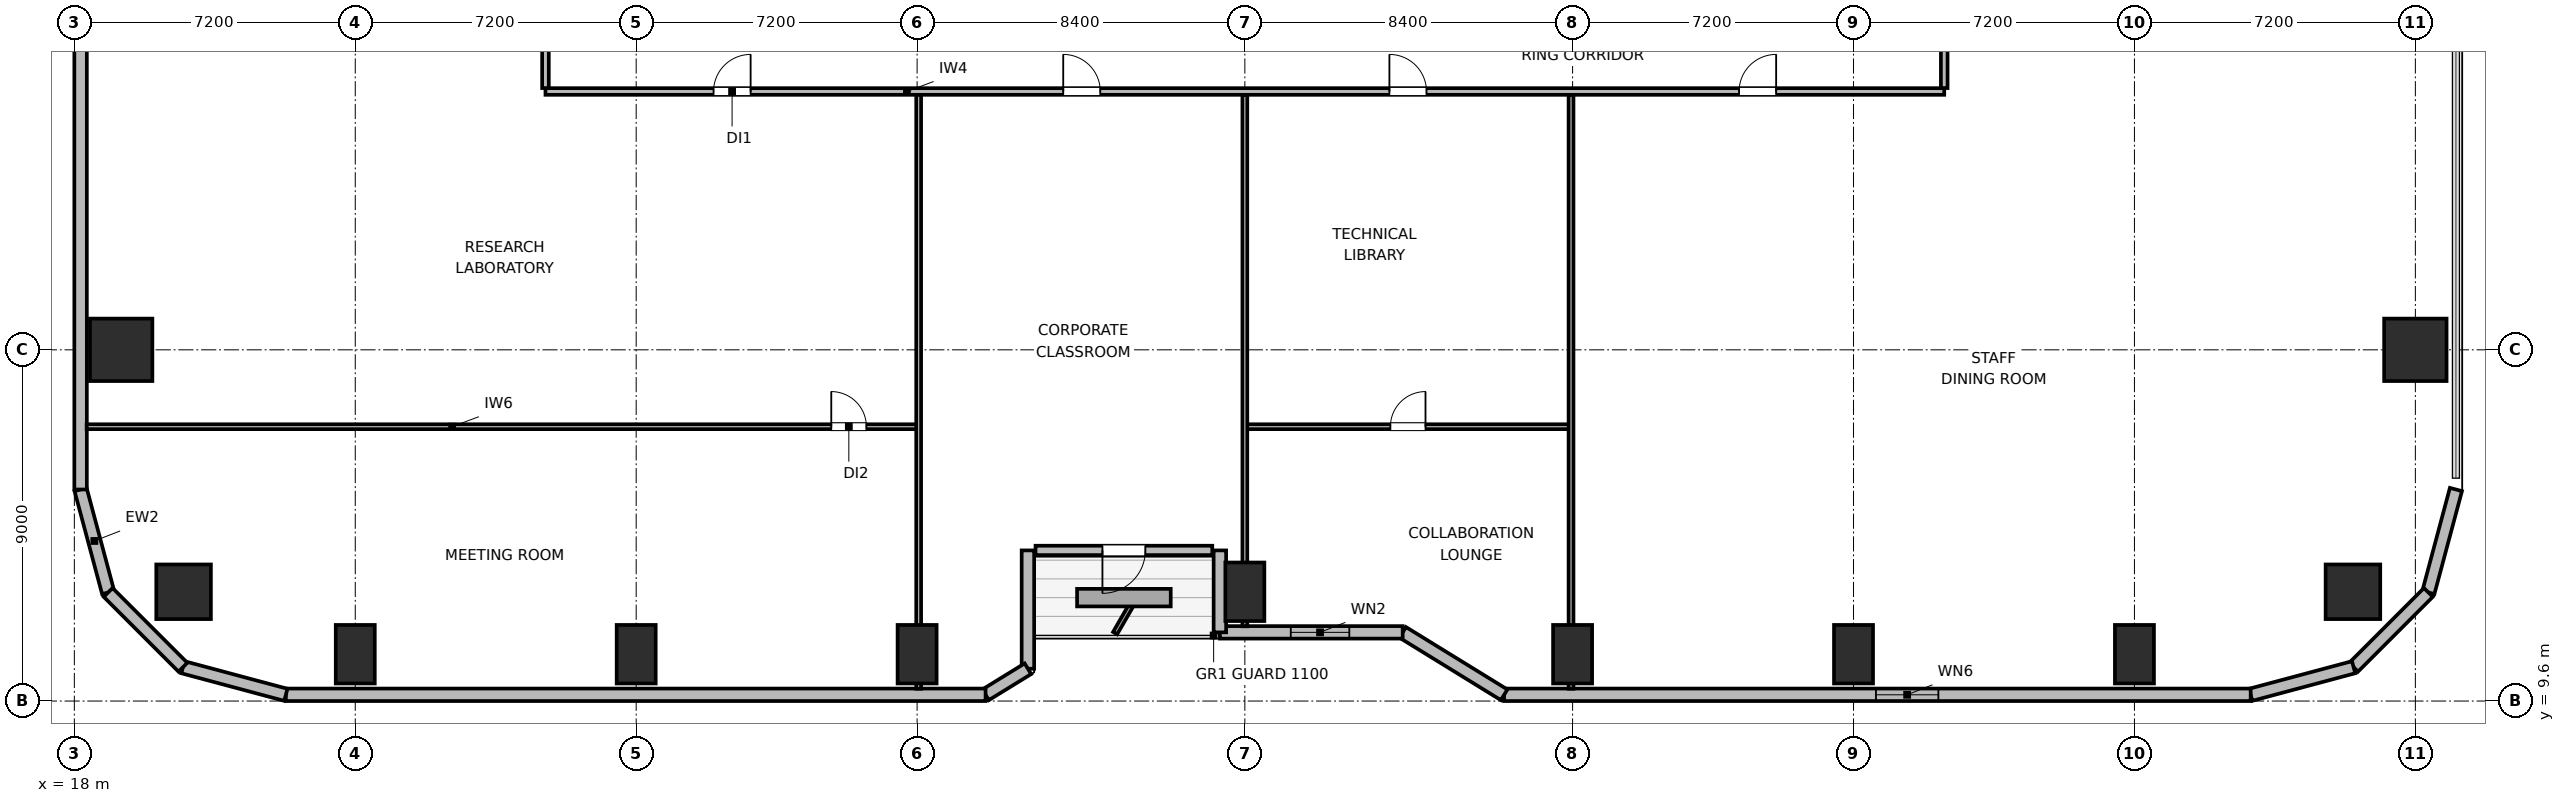
"""IFC4 building model, lengths in metres.
Left out: names, types, materials, properties, quantities, classifications, styles, units other than length and angle.
Written with IfcOpenShell. Run it as: python <this file> out.ifc"""

import sys

from ifc_helpers import new_model, si_unit, direction, frame, frame_2d, origin, origin_2d, place, context, subcontext, project, spatial, rectangle, circle, extrude, element, fill, save


model = new_model("IFC4")
c1 = context("Model", 3, precision=1e-05, world=origin(), true_north=direction((0.0, 1.0)))
c2 = subcontext(c1, "Body", "Model", "MODEL_VIEW")
j1 = project(units=[si_unit("LENGTHUNIT", "METRE"), si_unit("PLANEANGLEUNIT", "RADIAN")], contexts=[c1])
p1 = place(None, origin())
s1 = spatial("IfcSite", under=j1, at=p1, CompositionType="ELEMENT")
p2 = place(p1, origin())
s2 = spatial("IfcBuilding", under=s1, at=p2, CompositionType="ELEMENT")
p3 = place(p2, frame((0.0, 0.0, 33.3)))
s3 = spatial("IfcBuildingStorey", under=s2, at=p3, CompositionType="ELEMENT", Elevation=33.3)
for number, where, z_axis, x_axis in (
    (1, (20.8, 12.4, 0.0), (0.0, 0.0, 1.0), (1.0, 0.0, 0.0)),
    (2, (76.4, 12.4, 0.0), (0.0, 0.0, 1.0), (1.0, 0.0, 0.0)),
):
    element("IfcColumn", number, at=place(p3, frame(where, z_axis=z_axis, x_axis=x_axis)), inside=s3, PredefinedType="COLUMN", context=c2, shape_type="SweptSolid", body=[
        extrude(circle(Radius=0.7, at=origin_2d()), origin(), (0.0, 0.0, 1.0), 3.9),
    ])
for number, where, z_axis, x_axis in (
    (3, (25.2, 10.8, 0.0), (0.0, 0.0, 1.0), (1.0, 0.0, 0.0)),
    (4, (32.4, 10.8, 0.0), (0.0, 0.0, 1.0), (1.0, 0.0, 0.0)),
    (5, (39.6, 10.8, 0.0), (0.0, 0.0, 1.0), (1.0, 0.0, 0.0)),
    (6, (48.0, 12.4, 0.0), (0.0, 0.0, 1.0), (1.0, 0.0, 0.0)),
    (7, (56.4, 10.8, 0.0), (0.0, 0.0, 1.0), (1.0, 0.0, 0.0)),
    (8, (63.6, 10.8, 0.0), (0.0, 0.0, 1.0), (1.0, 0.0, 0.0)),
    (9, (70.8, 10.8, 0.0), (0.0, 0.0, 1.0), (1.0, 0.0, 0.0)),
):
    element("IfcColumn", number, at=place(p3, frame(where, z_axis=z_axis, x_axis=x_axis)), inside=s3, PredefinedType="COLUMN", context=c2, shape_type="SweptSolid", body=[
        extrude(rectangle(XDim=1.0, YDim=1.5, at=origin_2d()), origin(), (0.0, 0.0, 1.0), 3.9),
    ])
for number, where, z_axis, x_axis in (
    (10, (19.2, 18.6, 0.0), (0.0, 0.0, 1.0), (1.0, 0.0, 0.0)),
    (11, (78.0, 18.6, 0.0), (0.0, 0.0, 1.0), (1.0, 0.0, 0.0)),
):
    element("IfcColumn", number, at=place(p3, frame(where, z_axis=z_axis, x_axis=x_axis)), inside=s3, PredefinedType="COLUMN", context=c2, shape_type="SweptSolid", body=[
        extrude(rectangle(XDim=1.6, YDim=1.6, at=origin_2d()), origin(), (0.0, 0.0, 1.0), 3.9),
    ])
p4 = place(p3, frame((18.866, 12.383, 0.0), z_axis=(0.0, 0.0, 1.0), x_axis=(-0.25869736047, 0.965958423373, 0.0)))
e12 = element("IfcWall", 12, at=p4, inside=s3, PredefinedType="SOLIDWALL", context=c2, shape_type="SweptSolid", body=[
    extrude(rectangle(XDim=2.731, YDim=0.32, at=frame_2d((1.366, 0.0))), origin(), (0.0, 0.0, 1.0), 3.64),
])
p5 = place(p3, frame((18.16, 15.021, 0.0), z_axis=(0.0, 0.0, 1.0), x_axis=(0.0, 1.0, 0.0)))
e13 = element("IfcWall", 13, at=p5, inside=s3, PredefinedType="SOLIDWALL", context=c2, shape_type="SweptSolid", body=[
    extrude(rectangle(XDim=14.219, YDim=0.32, at=frame_2d((7.109, 0.0))), origin(), (0.0, 0.0, 1.0), 3.64),
])
p6 = place(p3, frame((79.04, 15.021, 0.0), z_axis=(0.0, 0.0, 1.0), x_axis=(-0.25869736047, -0.965958423373, 0.0)))
e14 = element("IfcWall", 14, at=p6, inside=s3, PredefinedType="SOLIDWALL", context=c2, shape_type="SweptSolid", body=[
    extrude(rectangle(XDim=2.731, YDim=0.32, at=frame_2d((1.366, 0.0))), origin(), (0.0, 0.0, 1.0), 3.64),
])
p7 = place(p3, frame((78.333, 12.383, 0.0), z_axis=(0.0, 0.0, 1.0), x_axis=(-0.707106781187, -0.707106781187, 0.0)))
e15 = element("IfcWall", 15, at=p7, inside=s3, PredefinedType="SOLIDWALL", context=c2, shape_type="SweptSolid", body=[
    extrude(rectangle(XDim=2.71, YDim=0.32, at=frame_2d((1.355, 0.0))), origin(), (0.0, 0.0, 1.0), 3.64),
])
p8 = place(p3, frame((76.417, 10.467, 0.0), z_axis=(0.0, 0.0, 1.0), x_axis=(-0.965964405026, -0.25867502435, 0.0)))
e16 = element("IfcWall", 16, at=p8, inside=s3, PredefinedType="SOLIDWALL", context=c2, shape_type="SweptSolid", body=[
    extrude(rectangle(XDim=2.731, YDim=0.32, at=frame_2d((1.366, 0.0))), origin(), (0.0, 0.0, 1.0), 3.64),
])
p9 = place(p3, frame((73.779, 9.76, 0.0), z_axis=(0.0, 0.0, 1.0), x_axis=(-1.0, 0.0, 0.0)))
e17 = element("IfcWall", 17, at=p9, inside=s3, PredefinedType="SOLIDWALL", context=c2, shape_type="SweptSolid", body=[
    extrude(rectangle(XDim=19.134, YDim=0.32, at=frame_2d((9.567, 0.0))), origin(), (0.0, 0.0, 1.0), 3.64),
])
p10 = place(p9, frame((8.004, 0.0, 0.85)))
e18 = element("IfcOpeningElement", 18, at=p10, cuts=e17, PredefinedType="OPENING", context=c2, shape_type="SweptSolid", body=[
    extrude(rectangle(XDim=1.6, YDim=1.0, at=frame_2d((0.8, 0.5))), frame((0.0, 0.17, 0.0), z_axis=(0.0, -1.0, 0.0), x_axis=(1.0, 0.0, 0.0)), (0.0, 0.0, 1.0), 0.34),
])
p11 = place(p3, frame((54.645, 9.76, 0.0), z_axis=(0.0, 0.0, 1.0), x_axis=(-0.851630857047, 0.524142044989, 0.0)))
e19 = element("IfcWall", 19, at=p11, inside=s3, PredefinedType="SOLIDWALL", context=c2, shape_type="SweptSolid", body=[
    extrude(rectangle(XDim=3.053, YDim=0.32, at=frame_2d((1.526, 0.0))), origin(), (0.0, 0.0, 1.0), 2.875),
])
p12 = place(p3, frame((52.045, 11.36, 0.0), z_axis=(0.0, 0.0, 1.0), x_axis=(-1.0, 0.0, 0.0)))
e20 = element("IfcWall", 20, at=p12, inside=s3, PredefinedType="SOLIDWALL", context=c2, shape_type="SweptSolid", body=[
    extrude(rectangle(XDim=4.685, YDim=0.32, at=frame_2d((2.343, 0.0))), origin(), (0.0, 0.0, 1.0), 2.875),
])
p13 = place(p12, frame((1.368, 0.0, 0.85)))
e21 = element("IfcOpeningElement", 21, at=p13, cuts=e20, PredefinedType="OPENING", context=c2, shape_type="SweptSolid", body=[
    extrude(rectangle(XDim=1.5, YDim=1.1, at=frame_2d((0.75, 0.55))), frame((0.0, 0.17, 0.0), z_axis=(0.0, -1.0, 0.0), x_axis=(1.0, 0.0, 0.0)), (0.0, 0.0, 1.0), 0.34),
])
p14 = place(p3, frame((47.36, 11.36, 0.0), z_axis=(0.0, 0.0, 1.0), x_axis=(0.0, 1.0, 0.0)))
e22 = element("IfcWall", 22, at=p14, inside=s3, PredefinedType="SOLIDWALL", context=c2, shape_type="SweptSolid", body=[
    extrude(rectangle(XDim=2.1, YDim=0.32, at=frame_2d((1.05, 0.0))), origin(), (0.0, 0.0, 1.0), 2.875),
])
p15 = place(p3, frame((47.165, 13.46, 0.0), z_axis=(0.0, 0.0, 1.0), x_axis=(-1.0, 0.0, 0.0)))
e23 = element("IfcWall", 23, at=p15, inside=s3, PredefinedType="SOLIDWALL", context=c2, shape_type="SweptSolid", body=[
    extrude(rectangle(XDim=4.53, YDim=0.24, at=frame_2d((2.265, 0.0))), origin(), (0.0, 0.0, 1.0), 3.64),
])
p16 = place(p15, frame((1.715, 0.0, 0.0)))
e24 = element("IfcOpeningElement", 24, at=p16, cuts=e23, PredefinedType="OPENING", context=c2, shape_type="SweptSolid", body=[
    extrude(rectangle(XDim=1.1, YDim=2.04, at=frame_2d((0.55, 1.02))), frame((0.0, 0.13, 0.0), z_axis=(0.0, -1.0, 0.0), x_axis=(1.0, 0.0, 0.0)), (0.0, 0.0, 1.0), 0.26),
])
p17 = place(p3, frame((42.44, 13.46, 0.0), z_axis=(0.0, 0.0, 1.0), x_axis=(0.0, -1.0, 0.0)))
e25 = element("IfcWall", 25, at=p17, inside=s3, PredefinedType="SOLIDWALL", context=c2, shape_type="SweptSolid", body=[
    extrude(rectangle(XDim=3.032, YDim=0.32, at=frame_2d((1.516, 0.0))), origin(), (0.0, 0.0, 1.0), 2.875),
])
p18 = place(p3, frame((42.44, 10.427, 0.0), z_axis=(0.0, 0.0, 1.0), x_axis=(-0.851776724646, -0.523904964045, 0.0)))
e26 = element("IfcWall", 26, at=p18, inside=s3, PredefinedType="SOLIDWALL", context=c2, shape_type="SweptSolid", body=[
    extrude(rectangle(XDim=1.274, YDim=0.32, at=frame_2d((0.637, 0.0))), origin(), (0.0, 0.0, 1.0), 3.64),
])
p19 = place(p3, frame((41.355, 9.76, 0.0), z_axis=(0.0, 0.0, 1.0), x_axis=(-1.0, 0.0, 0.0)))
e27 = element("IfcWall", 27, at=p19, inside=s3, PredefinedType="SOLIDWALL", context=c2, shape_type="SweptSolid", body=[
    extrude(rectangle(XDim=17.934, YDim=0.32, at=frame_2d((8.967, 0.0))), origin(), (0.0, 0.0, 1.0), 3.64),
])
p20 = place(p3, frame((23.421, 9.76, 0.0), z_axis=(0.0, 0.0, 1.0), x_axis=(-0.965964405026, 0.25867502435, 0.0)))
e28 = element("IfcWall", 28, at=p20, inside=s3, PredefinedType="SOLIDWALL", context=c2, shape_type="SweptSolid", body=[
    extrude(rectangle(XDim=2.731, YDim=0.32, at=frame_2d((1.366, 0.0))), origin(), (0.0, 0.0, 1.0), 3.64),
])
p21 = place(p3, frame((20.783, 10.467, 0.0), z_axis=(0.0, 0.0, 1.0), x_axis=(-0.707106781187, 0.707106781187, 0.0)))
e29 = element("IfcWall", 29, at=p21, inside=s3, PredefinedType="SOLIDWALL", context=c2, shape_type="SweptSolid", body=[
    extrude(rectangle(XDim=2.71, YDim=0.32, at=frame_2d((1.355, 0.0))), origin(), (0.0, 0.0, 1.0), 3.64),
])
p22 = place(p3, frame((30.075, 25.22, 0.0), z_axis=(0.0, 0.0, 1.0), x_axis=(1.0, 0.0, 0.0)))
e30 = element("IfcWall", 30, at=p22, inside=s3, PredefinedType="PARTITIONING", context=c2, shape_type="SweptSolid", body=[
    extrude(rectangle(XDim=35.85, YDim=0.17, at=frame_2d((17.925, 0.0))), origin(), (0.0, 0.0, 1.0), 3.64),
])
p23 = place(p22, frame((4.308, 0.0, 0.0)))
e31 = element("IfcOpeningElement", 31, at=p23, cuts=e30, PredefinedType="OPENING", context=c2, shape_type="SweptSolid", body=[
    extrude(rectangle(XDim=0.95, YDim=2.04, at=frame_2d((0.475, 1.02))), frame((0.0, 0.095, 0.0), z_axis=(0.0, -1.0, 0.0), x_axis=(1.0, 0.0, 0.0)), (0.0, 0.0, 1.0), 0.19),
])
p24 = place(p22, frame((13.27, 0.0, 0.0)))
e32 = element("IfcOpeningElement", 32, at=p24, cuts=e30, PredefinedType="OPENING", context=c2, shape_type="SweptSolid", body=[
    extrude(rectangle(XDim=0.95, YDim=2.04, at=frame_2d((0.475, 1.02))), frame((0.0, 0.095, 0.0), z_axis=(0.0, -1.0, 0.0), x_axis=(1.0, 0.0, 0.0)), (0.0, 0.0, 1.0), 0.19),
])
p25 = place(p22, frame((21.63, 0.0, 0.0)))
e33 = element("IfcOpeningElement", 33, at=p25, cuts=e30, PredefinedType="OPENING", context=c2, shape_type="SweptSolid", body=[
    extrude(rectangle(XDim=0.95, YDim=2.04, at=frame_2d((0.475, 1.02))), frame((0.0, 0.095, 0.0), z_axis=(0.0, -1.0, 0.0), x_axis=(1.0, 0.0, 0.0)), (0.0, 0.0, 1.0), 0.19),
])
p26 = place(p22, frame((30.592, 0.0, 0.0)))
e34 = element("IfcOpeningElement", 34, at=p26, cuts=e30, PredefinedType="OPENING", context=c2, shape_type="SweptSolid", body=[
    extrude(rectangle(XDim=0.95, YDim=2.04, at=frame_2d((0.475, 1.02))), frame((0.0, 0.095, 0.0), z_axis=(0.0, -1.0, 0.0), x_axis=(1.0, 0.0, 0.0)), (0.0, 0.0, 1.0), 0.19),
])
p27 = place(p3, frame((30.075, 25.307, 0.0), z_axis=(0.0, 0.0, 1.0), x_axis=(0.0, 1.0, 0.0)))
e35 = element("IfcWall", 35, at=p27, inside=s3, PredefinedType="PARTITIONING", context=c2, shape_type="SweptSolid", body=[
    extrude(rectangle(XDim=21.386, YDim=0.17, at=frame_2d((10.693, 0.0))), origin(), (0.0, 0.0, 1.0), 3.64),
])
p28 = place(p27, frame((3.528, 0.0, 0.0)))
e36 = element("IfcOpeningElement", 36, at=p28, cuts=e35, PredefinedType="OPENING", context=c2, shape_type="SweptSolid", body=[
    extrude(rectangle(XDim=0.95, YDim=2.04, at=frame_2d((0.475, 1.02))), frame((0.0, 0.095, 0.0), z_axis=(0.0, -1.0, 0.0), x_axis=(1.0, 0.0, 0.0)), (0.0, 0.0, 1.0), 0.19),
])
p29 = place(p27, frame((10.818, 0.0, 0.0)))
e37 = element("IfcOpeningElement", 37, at=p29, cuts=e35, PredefinedType="OPENING", context=c2, shape_type="SweptSolid", body=[
    extrude(rectangle(XDim=0.95, YDim=2.04, at=frame_2d((0.475, 1.02))), frame((0.0, 0.095, 0.0), z_axis=(0.0, -1.0, 0.0), x_axis=(1.0, 0.0, 0.0)), (0.0, 0.0, 1.0), 0.19),
])
p30 = place(p27, frame((17.508, 0.0, 0.0)))
e38 = element("IfcOpeningElement", 38, at=p30, cuts=e35, PredefinedType="OPENING", context=c2, shape_type="SweptSolid", body=[
    extrude(rectangle(XDim=0.95, YDim=2.04, at=frame_2d((0.475, 1.02))), frame((0.0, 0.095, 0.0), z_axis=(0.0, -1.0, 0.0), x_axis=(1.0, 0.0, 0.0)), (0.0, 0.0, 1.0), 0.19),
])
p31 = place(p3, frame((65.925, 25.307, 0.0), z_axis=(0.0, 0.0, 1.0), x_axis=(0.0, 1.0, 0.0)))
e39 = element("IfcWall", 39, at=p31, inside=s3, PredefinedType="PARTITIONING", context=c2, shape_type="SweptSolid", body=[
    extrude(rectangle(XDim=21.386, YDim=0.17, at=frame_2d((10.693, 0.0))), origin(), (0.0, 0.0, 1.0), 3.64),
])
p32 = place(p31, frame((5.428, 0.0, 0.0)))
e40 = element("IfcOpeningElement", 40, at=p32, cuts=e39, PredefinedType="OPENING", context=c2, shape_type="SweptSolid", body=[
    extrude(rectangle(XDim=0.95, YDim=2.04, at=frame_2d((0.475, 1.02))), frame((0.0, 0.095, 0.0), z_axis=(0.0, -1.0, 0.0), x_axis=(1.0, 0.0, 0.0)), (0.0, 0.0, 1.0), 0.19),
])
p33 = place(p31, frame((16.208, 0.0, 0.0)))
e41 = element("IfcOpeningElement", 41, at=p33, cuts=e39, PredefinedType="OPENING", context=c2, shape_type="SweptSolid", body=[
    extrude(rectangle(XDim=0.95, YDim=2.04, at=frame_2d((0.475, 1.02))), frame((0.0, 0.095, 0.0), z_axis=(0.0, -1.0, 0.0), x_axis=(1.0, 0.0, 0.0)), (0.0, 0.0, 1.0), 0.19),
])
p34 = place(p3, frame((18.315, 16.63, 0.0), z_axis=(0.0, 0.0, 1.0), x_axis=(1.0, 0.0, 0.0)))
e42 = element("IfcWall", 42, at=p34, inside=s3, PredefinedType="PARTITIONING", context=c2, shape_type="SweptSolid", body=[
    extrude(rectangle(XDim=21.325, YDim=0.125, at=frame_2d((10.663, 0.0))), origin(), (0.0, 0.0, 1.0), 3.64),
])
p35 = place(p34, frame((19.085, 0.0, 0.0)))
e43 = element("IfcOpeningElement", 43, at=p35, cuts=e42, PredefinedType="OPENING", context=c2, shape_type="SweptSolid", body=[
    extrude(rectangle(XDim=0.9, YDim=2.02, at=frame_2d((0.45, 1.01))), frame((0.0, 0.073, 0.0), z_axis=(0.0, -1.0, 0.0), x_axis=(1.0, 0.0, 0.0)), (0.0, 0.0, 1.0), 0.145),
])
p36 = place(p3, frame((39.64, 9.915, 0.0), z_axis=(0.0, 0.0, 1.0), x_axis=(0.0, 1.0, 0.0)))
e44 = element("IfcWall", 44, at=p36, inside=s3, PredefinedType="PARTITIONING", context=c2, shape_type="SweptSolid", body=[
    extrude(rectangle(XDim=15.218, YDim=0.125, at=frame_2d((7.609, 0.0))), origin(), (0.0, 0.0, 1.0), 2.93),
])
p37 = place(p3, frame((48.0, 16.63, 0.0), z_axis=(0.0, 0.0, 1.0), x_axis=(1.0, 0.0, 0.0)))
e45 = element("IfcWall", 45, at=p37, inside=s3, PredefinedType="PARTITIONING", context=c2, shape_type="SweptSolid", body=[
    extrude(rectangle(XDim=8.36, YDim=0.125, at=frame_2d((4.18, 0.0))), origin(), (0.0, 0.0, 1.0), 3.64),
])
p38 = place(p37, frame((3.73, 0.0, 0.0)))
e46 = element("IfcOpeningElement", 46, at=p38, cuts=e45, PredefinedType="OPENING", context=c2, shape_type="SweptSolid", body=[
    extrude(rectangle(XDim=0.9, YDim=2.02, at=frame_2d((0.45, 1.01))), frame((0.0, 0.073, 0.0), z_axis=(0.0, -1.0, 0.0), x_axis=(1.0, 0.0, 0.0)), (0.0, 0.0, 1.0), 0.145),
])
p39 = place(p3, frame((48.0, 11.515, 0.0), z_axis=(0.0, 0.0, 1.0), x_axis=(0.0, 1.0, 0.0)))
e47 = element("IfcWall", 47, at=p39, inside=s3, PredefinedType="PARTITIONING", context=c2, shape_type="SweptSolid", body=[
    extrude(rectangle(XDim=13.618, YDim=0.125, at=frame_2d((6.809, 0.0))), origin(), (0.0, 0.0, 1.0), 2.93),
])
p40 = place(p3, frame((56.36, 9.915, 0.0), z_axis=(0.0, 0.0, 1.0), x_axis=(0.0, 1.0, 0.0)))
e48 = element("IfcWall", 48, at=p40, inside=s3, PredefinedType="PARTITIONING", context=c2, shape_type="SweptSolid", body=[
    extrude(rectangle(XDim=15.218, YDim=0.125, at=frame_2d((7.609, 0.0))), origin(), (0.0, 0.0, 1.0), 2.93),
])
p41 = place(p10, origin())
e49 = element("IfcWindow", 49, at=p41, inside=s3, PartitioningType="SINGLE_PANEL", PredefinedType="WINDOW", context=c2, shape_type="SweptSolid", body=[
    extrude(rectangle(XDim=1.6, YDim=1.0, at=frame_2d((0.8, 0.5))), frame((0.0, 0.03, 0.0), z_axis=(0.0, -1.0, 0.0), x_axis=(1.0, 0.0, 0.0)), (0.0, 0.0, 1.0), 0.06),
])
fill(e18, e49)
p42 = place(p13, origin())
e50 = element("IfcWindow", 50, at=p42, inside=s3, PartitioningType="SINGLE_PANEL", PredefinedType="WINDOW", context=c2, shape_type="SweptSolid", body=[
    extrude(rectangle(XDim=1.5, YDim=1.1, at=frame_2d((0.75, 0.55))), frame((0.0, 0.03, 0.0), z_axis=(0.0, -1.0, 0.0), x_axis=(1.0, 0.0, 0.0)), (0.0, 0.0, 1.0), 0.06),
])
fill(e21, e50)
p43 = place(p16, origin())
e51 = element("IfcDoor", 51, at=p43, inside=s3, OperationType="SINGLE_SWING_RIGHT", PredefinedType="DOOR", context=c2, shape_type="SweptSolid", body=[
    extrude(rectangle(XDim=1.1, YDim=2.04, at=frame_2d((0.55, 1.02))), frame((0.0, 0.025, 0.0), z_axis=(0.0, -1.0, 0.0), x_axis=(1.0, 0.0, 0.0)), (0.0, 0.0, 1.0), 0.05),
])
fill(e24, e51)
p44 = place(p35, origin())
e52 = element("IfcDoor", 52, at=p44, inside=s3, OperationType="SINGLE_SWING_LEFT", PredefinedType="DOOR", context=c2, shape_type="SweptSolid", body=[
    extrude(rectangle(XDim=0.9, YDim=2.02, at=frame_2d((0.45, 1.01))), frame((0.0, 0.025, 0.0), z_axis=(0.0, -1.0, 0.0), x_axis=(1.0, 0.0, 0.0)), (0.0, 0.0, 1.0), 0.05),
])
fill(e43, e52)
p45 = place(p23, origin())
e53 = element("IfcDoor", 53, at=p45, inside=s3, OperationType="SINGLE_SWING_RIGHT", PredefinedType="DOOR", context=c2, shape_type="SweptSolid", body=[
    extrude(rectangle(XDim=0.95, YDim=2.04, at=frame_2d((0.475, 1.02))), frame((0.0, 0.025, 0.0), z_axis=(0.0, -1.0, 0.0), x_axis=(1.0, 0.0, 0.0)), (0.0, 0.0, 1.0), 0.05),
])
fill(e31, e53)
p46 = place(p24, origin())
e54 = element("IfcDoor", 54, at=p46, inside=s3, OperationType="SINGLE_SWING_LEFT", PredefinedType="DOOR", context=c2, shape_type="SweptSolid", body=[
    extrude(rectangle(XDim=0.95, YDim=2.04, at=frame_2d((0.475, 1.02))), frame((0.0, 0.025, 0.0), z_axis=(0.0, -1.0, 0.0), x_axis=(1.0, 0.0, 0.0)), (0.0, 0.0, 1.0), 0.05),
])
fill(e32, e54)
p47 = place(p38, origin())
e55 = element("IfcDoor", 55, at=p47, inside=s3, OperationType="SINGLE_SWING_RIGHT", PredefinedType="DOOR", context=c2, shape_type="SweptSolid", body=[
    extrude(rectangle(XDim=0.9, YDim=2.02, at=frame_2d((0.45, 1.01))), frame((0.0, 0.025, 0.0), z_axis=(0.0, -1.0, 0.0), x_axis=(1.0, 0.0, 0.0)), (0.0, 0.0, 1.0), 0.05),
])
fill(e46, e55)
p48 = place(p25, origin())
e56 = element("IfcDoor", 56, at=p48, inside=s3, OperationType="SINGLE_SWING_LEFT", PredefinedType="DOOR", context=c2, shape_type="SweptSolid", body=[
    extrude(rectangle(XDim=0.95, YDim=2.04, at=frame_2d((0.475, 1.02))), frame((0.0, 0.025, 0.0), z_axis=(0.0, -1.0, 0.0), x_axis=(1.0, 0.0, 0.0)), (0.0, 0.0, 1.0), 0.05),
])
fill(e33, e56)
p49 = place(p26, origin())
e57 = element("IfcDoor", 57, at=p49, inside=s3, OperationType="SINGLE_SWING_RIGHT", PredefinedType="DOOR", context=c2, shape_type="SweptSolid", body=[
    extrude(rectangle(XDim=0.95, YDim=2.04, at=frame_2d((0.475, 1.02))), frame((0.0, 0.025, 0.0), z_axis=(0.0, -1.0, 0.0), x_axis=(1.0, 0.0, 0.0)), (0.0, 0.0, 1.0), 0.05),
])
fill(e34, e57)
save(model, sys.argv[1])
